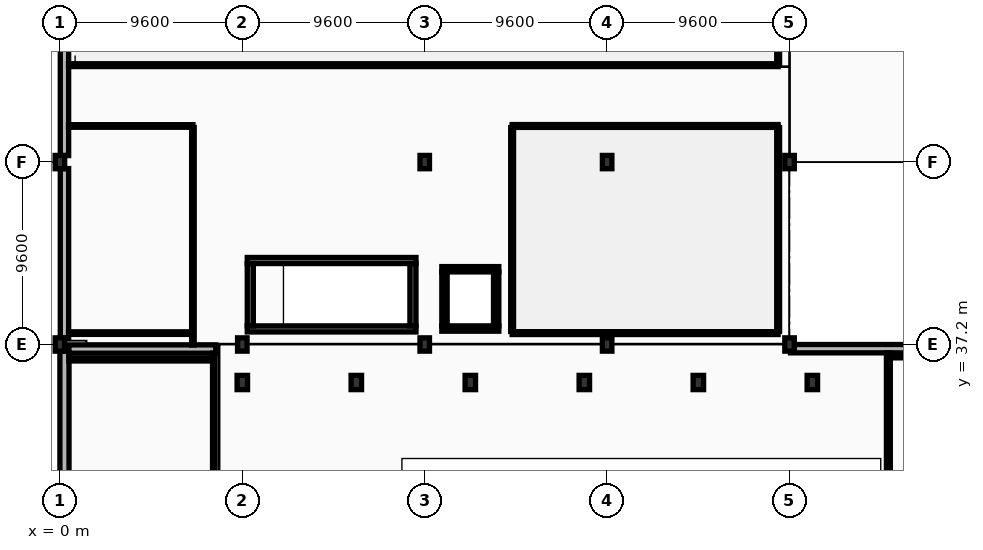
"""IFC4 building model, lengths in metres.
Left out: names, types, materials, properties, quantities, classifications, styles, units other than length and angle.
Written with IfcOpenShell. Run it as: python <this file> out.ifc"""

import sys

from ifc_helpers import new_model, si_unit, direction, frame, frame_2d, origin, origin_2d, place, context, subcontext, project, spatial, rectangle, extrude, element, fill, save


model = new_model("IFC4")
c1 = context("Model", 3, precision=1e-05, world=origin(), true_north=direction((0.0, 1.0)))
c2 = subcontext(c1, "Body", "Model", "MODEL_VIEW")
j1 = project(units=[si_unit("LENGTHUNIT", "METRE"), si_unit("PLANEANGLEUNIT", "RADIAN")], contexts=[c1])
p1 = place(None, origin())
s1 = spatial("IfcSite", under=j1, at=p1, CompositionType="ELEMENT")
p2 = place(p1, origin())
s2 = spatial("IfcBuilding", under=s1, at=p2, CompositionType="ELEMENT")
p3 = place(p2, frame((0.0, 0.0, 5.4)))
s3 = spatial("IfcBuildingStorey", under=s2, at=p3, CompositionType="ELEMENT", Elevation=5.4)
for number, where, z_axis, x_axis in (
    (1, (0.0, 37.2, 0.0), (0.0, 0.0, 1.0), (1.0, 0.0, 0.0)),
    (2, (0.0, 46.8, 0.0), (0.0, 0.0, 1.0), (1.0, 0.0, 0.0)),
    (3, (9.6, 37.2, 0.0), (0.0, 0.0, 1.0), (1.0, 0.0, 0.0)),
    (4, (19.2, 37.2, 0.0), (0.0, 0.0, 1.0), (1.0, 0.0, 0.0)),
    (5, (19.2, 46.8, 0.0), (0.0, 0.0, 1.0), (1.0, 0.0, 0.0)),
    (6, (28.8, 37.2, 0.0), (0.0, 0.0, 1.0), (1.0, 0.0, 0.0)),
    (7, (28.8, 46.8, 0.0), (0.0, 0.0, 1.0), (1.0, 0.0, 0.0)),
    (8, (38.4, 37.2, 0.0), (0.0, 0.0, 1.0), (1.0, 0.0, 0.0)),
    (9, (38.4, 46.8, 0.0), (0.0, 0.0, 1.0), (1.0, 0.0, 0.0)),
):
    element("IfcColumn", number, at=place(p3, frame(where, z_axis=z_axis, x_axis=x_axis)), inside=s3, PredefinedType="COLUMN", context=c2, shape_type="SweptSolid", body=[
        extrude(rectangle(XDim=0.5, YDim=0.7, at=origin_2d()), origin(), (0.0, 0.0, 1.0), 4.5),
    ])
for number, where, z_axis, x_axis in (
    (10, (9.6, 35.2, 0.0), (0.0, 0.0, 1.0), (1.0, 0.0, 0.0)),
    (11, (15.6, 35.2, 0.0), (0.0, 0.0, 1.0), (1.0, 0.0, 0.0)),
    (12, (21.6, 35.2, 0.0), (0.0, 0.0, 1.0), (1.0, 0.0, 0.0)),
    (13, (27.6, 35.2, 0.0), (0.0, 0.0, 1.0), (1.0, 0.0, 0.0)),
    (14, (33.6, 35.2, 0.0), (0.0, 0.0, 1.0), (1.0, 0.0, 0.0)),
    (15, (39.6, 35.2, 0.0), (0.0, 0.0, 1.0), (1.0, 0.0, 0.0)),
):
    element("IfcColumn", number, at=place(p3, frame(where, z_axis=z_axis, x_axis=x_axis)), inside=s3, PredefinedType="COLUMN", context=c2, shape_type="SweptSolid", body=[
        extrude(rectangle(XDim=0.55, YDim=0.75, at=origin_2d()), origin(), (0.0, 0.0, 1.0), 4.5),
    ])
p4 = place(p3, frame((0.24, 37.542, 0.0), z_axis=(0.0, 0.0, 1.0), x_axis=(0.0, 1.0, 0.0)))
e16 = element("IfcWall", 16, at=p4, inside=s3, PredefinedType="STANDARD", context=c2, shape_type="SweptSolid", body=[
    extrude(rectangle(XDim=8.916, YDim=0.44, at=frame_2d((4.458, 0.0))), origin(), (0.0, 0.0, 1.0), 3.38),
])
p5 = place(p4, frame((1.308, 0.0, 0.9)))
e17 = element("IfcOpeningElement", 17, at=p5, cuts=e16, PredefinedType="OPENING", context=c2, shape_type="SweptSolid", body=[
    extrude(rectangle(XDim=1.3, YDim=2.1, at=frame_2d((0.65, 1.05))), frame((0.0, 0.23, 0.0), z_axis=(0.0, -1.0, 0.0), x_axis=(1.0, 0.0, 0.0)), (0.0, 0.0, 1.0), 0.46),
])
p6 = place(p4, frame((3.808, 0.0, 0.9)))
e18 = element("IfcOpeningElement", 18, at=p6, cuts=e16, PredefinedType="OPENING", context=c2, shape_type="SweptSolid", body=[
    extrude(rectangle(XDim=1.3, YDim=2.1, at=frame_2d((0.65, 1.05))), frame((0.0, 0.23, 0.0), z_axis=(0.0, -1.0, 0.0), x_axis=(1.0, 0.0, 0.0)), (0.0, 0.0, 1.0), 0.46),
])
p7 = place(p4, frame((6.308, 0.0, 0.9)))
e19 = element("IfcOpeningElement", 19, at=p7, cuts=e16, PredefinedType="OPENING", context=c2, shape_type="SweptSolid", body=[
    extrude(rectangle(XDim=1.3, YDim=2.1, at=frame_2d((0.65, 1.05))), frame((0.0, 0.23, 0.0), z_axis=(0.0, -1.0, 0.0), x_axis=(1.0, 0.0, 0.0)), (0.0, 0.0, 1.0), 0.46),
])
p8 = place(p3, frame((0.24, 47.142, 0.0), z_axis=(0.0, 0.0, 1.0), x_axis=(0.0, 1.0, 0.0)))
e20 = element("IfcWall", 20, at=p8, inside=s3, PredefinedType="STANDARD", context=c2, shape_type="SweptSolid", body=[
    extrude(rectangle(XDim=8.916, YDim=0.44, at=frame_2d((4.458, 0.0))), origin(), (0.0, 0.0, 1.0), 3.38),
])
p9 = place(p8, frame((6.308, 0.0, 0.9)))
e21 = element("IfcOpeningElement", 21, at=p9, cuts=e20, PredefinedType="OPENING", context=c2, shape_type="SweptSolid", body=[
    extrude(rectangle(XDim=1.3, YDim=2.1, at=frame_2d((0.65, 1.05))), frame((0.0, 0.23, 0.0), z_axis=(0.0, -1.0, 0.0), x_axis=(1.0, 0.0, 0.0)), (0.0, 0.0, 1.0), 0.46),
])
p10 = place(p3, frame((0.24, 29.017, 0.0), z_axis=(0.0, 0.0, 1.0), x_axis=(0.0, 1.0, 0.0)))
e22 = element("IfcWall", 22, at=p10, inside=s3, PredefinedType="STANDARD", context=c2, shape_type="SweptSolid", body=[
    extrude(rectangle(XDim=7.841, YDim=0.48, at=frame_2d((3.92, 0.0))), origin(), (0.0, 0.0, 1.0), 3.38),
])
p11 = place(p10, frame((1.533, 0.0, 0.85)))
e23 = element("IfcOpeningElement", 23, at=p11, cuts=e22, PredefinedType="OPENING", context=c2, shape_type="SweptSolid", body=[
    extrude(rectangle(XDim=1.6, YDim=2.25, at=frame_2d((0.8, 1.125))), frame((0.0, 0.25, 0.0), z_axis=(0.0, -1.0, 0.0), x_axis=(1.0, 0.0, 0.0)), (0.0, 0.0, 1.0), 0.5),
])
p12 = place(p10, frame((4.733, 0.0, 0.85)))
e24 = element("IfcOpeningElement", 24, at=p12, cuts=e22, PredefinedType="OPENING", context=c2, shape_type="SweptSolid", body=[
    extrude(rectangle(XDim=1.6, YDim=2.25, at=frame_2d((0.8, 1.125))), frame((0.0, 0.25, 0.0), z_axis=(0.0, -1.0, 0.0), x_axis=(1.0, 0.0, 0.0)), (0.0, 0.0, 1.0), 0.5),
])
p13 = place(p3, frame((0.472, 36.96, 0.0), z_axis=(0.0, 0.0, 1.0), x_axis=(1.0, 0.0, 0.0)))
e25 = element("IfcWall", 25, at=p13, inside=s3, PredefinedType="STANDARD", context=c2, shape_type="SweptSolid", body=[
    extrude(rectangle(XDim=7.728, YDim=0.44, at=frame_2d((3.864, 0.0))), origin(), (0.0, 0.0, 1.0), 3.38),
])
p14 = place(p3, frame((38.45, 36.98, 0.0), z_axis=(0.0, 0.0, 1.0), x_axis=(1.0, 0.0, 0.0)))
e26 = element("IfcWall", 26, at=p14, inside=s3, PredefinedType="STANDARD", context=c2, shape_type="SweptSolid", body=[
    extrude(rectangle(XDim=16.55, YDim=0.44, at=frame_2d((8.275, 0.0))), origin(), (0.0, 0.0, 1.0), 3.38),
])
for number, where, z_axis, x_axis in (
    (27, (9.86, 41.62, 0.0), (0.0, 0.0, 1.0), (1.0, 0.0, 0.0)),
    (28, (18.74, 38.02, 0.0), (0.0, 0.0, 1.0), (-1.0, 0.0, 0.0)),
):
    element("IfcWall", number, at=place(p3, frame(where, z_axis=z_axis, x_axis=x_axis)), inside=s3, PredefinedType="SHEAR", context=c2, shape_type="SweptSolid", body=[
        extrude(rectangle(XDim=8.88, YDim=0.32, at=frame_2d((4.44, 0.0))), origin(), (0.0, 0.0, 1.0), 4.24),
    ])
p15 = place(p3, frame((10.02, 38.18, 0.0), z_axis=(0.0, 0.0, 1.0), x_axis=(0.0, 1.0, 0.0)))
e29 = element("IfcWall", 29, at=p15, inside=s3, PredefinedType="SHEAR", context=c2, shape_type="SweptSolid", body=[
    extrude(rectangle(XDim=3.28, YDim=0.32, at=frame_2d((1.64, 0.0))), origin(), (0.0, 0.0, 1.0), 4.24),
])
p16 = place(p15, frame((1.065, 0.0, 0.0)))
e30 = element("IfcOpeningElement", 30, at=p16, cuts=e29, PredefinedType="OPENING", context=c2, shape_type="SweptSolid", body=[
    extrude(rectangle(XDim=1.15, YDim=2.2, at=frame_2d((0.575, 1.1))), frame((0.0, 0.17, 0.0), z_axis=(0.0, -1.0, 0.0), x_axis=(1.0, 0.0, 0.0)), (0.0, 0.0, 1.0), 0.34),
])
p17 = place(p3, frame((18.58, 41.46, 0.0), z_axis=(0.0, 0.0, 1.0), x_axis=(0.0, -1.0, 0.0)))
e31 = element("IfcWall", 31, at=p17, inside=s3, PredefinedType="SHEAR", context=c2, shape_type="SweptSolid", body=[
    extrude(rectangle(XDim=3.28, YDim=0.32, at=frame_2d((1.64, 0.0))), origin(), (0.0, 0.0, 1.0), 4.24),
])
p18 = place(p3, frame((20.1, 41.16, 0.0), z_axis=(0.0, 0.0, 1.0), x_axis=(1.0, 0.0, 0.0)))
e32 = element("IfcWall", 32, at=p18, inside=s3, PredefinedType="SHEAR", context=c2, shape_type="SweptSolid", body=[
    extrude(rectangle(XDim=3.0, YDim=0.28, at=frame_2d((1.5, 0.0))), origin(), (0.0, 0.0, 1.0), 4.24),
])
p19 = place(p18, frame((0.975, 0.0, 0.0)))
e33 = element("IfcOpeningElement", 33, at=p19, cuts=e32, PredefinedType="OPENING", context=c2, shape_type="SweptSolid", body=[
    extrude(rectangle(XDim=1.05, YDim=2.2, at=frame_2d((0.525, 1.1))), frame((0.0, 0.15, 0.0), z_axis=(0.0, -1.0, 0.0), x_axis=(1.0, 0.0, 0.0)), (0.0, 0.0, 1.0), 0.3),
])
p20 = place(p3, frame((23.1, 38.04, 0.0), z_axis=(0.0, 0.0, 1.0), x_axis=(-1.0, 0.0, 0.0)))
e34 = element("IfcWall", 34, at=p20, inside=s3, PredefinedType="SHEAR", context=c2, shape_type="SweptSolid", body=[
    extrude(rectangle(XDim=3.0, YDim=0.28, at=frame_2d((1.5, 0.0))), origin(), (0.0, 0.0, 1.0), 4.24),
])
for number, where, z_axis, x_axis in (
    (35, (20.24, 38.18, 0.0), (0.0, 0.0, 1.0), (0.0, 1.0, 0.0)),
    (36, (22.96, 41.02, 0.0), (0.0, 0.0, 1.0), (0.0, -1.0, 0.0)),
):
    element("IfcWall", number, at=place(p3, frame(where, z_axis=z_axis, x_axis=x_axis)), inside=s3, PredefinedType="SHEAR", context=c2, shape_type="SweptSolid", body=[
        extrude(rectangle(XDim=2.84, YDim=0.28, at=frame_2d((1.42, 0.0))), origin(), (0.0, 0.0, 1.0), 4.24),
    ])
p21 = place(p3, frame((37.8, 51.9, 0.0), z_axis=(0.0, 0.0, 1.0), x_axis=(-1.0, 0.0, 0.0)))
e37 = element("IfcWall", 37, at=p21, inside=s3, PredefinedType="PARTITIONING", context=c2, shape_type="SweptSolid", body=[
    extrude(rectangle(XDim=37.346, YDim=0.15, at=frame_2d((18.673, 0.0))), origin(), (0.0, 0.0, 1.0), 3.23),
])
p22 = place(p21, frame((2.107, 0.0, 0.0)))
e38 = element("IfcOpeningElement", 38, at=p22, cuts=e37, PredefinedType="OPENING", context=c2, shape_type="SweptSolid", body=[
    extrude(rectangle(XDim=1.5, YDim=2.35, at=frame_2d((0.75, 1.175))), frame((0.0, 0.085, 0.0), z_axis=(0.0, -1.0, 0.0), x_axis=(1.0, 0.0, 0.0)), (0.0, 0.0, 1.0), 0.17),
])
p23 = place(p3, frame((37.8, 66.515, 0.0), z_axis=(0.0, 0.0, 1.0), x_axis=(0.0, -1.0, 0.0)))
e39 = element("IfcWall", 39, at=p23, inside=s3, PredefinedType="PARTITIONING", context=c2, shape_type="SweptSolid", body=[
    extrude(rectangle(XDim=14.53, YDim=0.15, at=frame_2d((7.265, 0.0))), origin(), (0.0, 0.0, 1.0), 3.43),
])
p24 = place(p3, frame((0.454, 48.7, 0.0), z_axis=(0.0, 0.0, 1.0), x_axis=(1.0, 0.0, 0.0)))
e40 = element("IfcWall", 40, at=p24, inside=s3, PredefinedType="PARTITIONING", context=c2, shape_type="SweptSolid", body=[
    extrude(rectangle(XDim=6.546, YDim=0.135, at=frame_2d((3.273, 0.0))), origin(), (0.0, 0.0, 1.0), 3.38),
])
p25 = place(p24, frame((2.064, 0.0, 0.0)))
e41 = element("IfcOpeningElement", 41, at=p25, cuts=e40, PredefinedType="OPENING", context=c2, shape_type="SweptSolid", body=[
    extrude(rectangle(XDim=0.95, YDim=2.15, at=frame_2d((0.475, 1.075))), frame((0.0, 0.077, 0.0), z_axis=(0.0, -1.0, 0.0), x_axis=(1.0, 0.0, 0.0)), (0.0, 0.0, 1.0), 0.155),
])
p26 = place(p3, frame((7.0, 37.8, 0.0), z_axis=(0.0, 0.0, 1.0), x_axis=(-1.0, 0.0, 0.0)))
e42 = element("IfcWall", 42, at=p26, inside=s3, PredefinedType="PARTITIONING", context=c2, shape_type="SweptSolid", body=[
    extrude(rectangle(XDim=6.546, YDim=0.135, at=frame_2d((3.273, 0.0))), origin(), (0.0, 0.0, 1.0), 3.38),
])
p27 = place(p3, frame((7.0, 48.623, 0.0), z_axis=(0.0, 0.0, 1.0), x_axis=(0.0, -1.0, 0.0)))
e43 = element("IfcWall", 43, at=p27, inside=s3, PredefinedType="PARTITIONING", context=c2, shape_type="SweptSolid", body=[
    extrude(rectangle(XDim=11.448, YDim=0.135, at=frame_2d((5.724, 0.0))), origin(), (0.0, 0.0, 1.0), 3.43),
])
p28 = place(p3, frame((23.8, 48.7, 0.0), z_axis=(0.0, 0.0, 1.0), x_axis=(1.0, 0.0, 0.0)))
e44 = element("IfcWall", 44, at=p28, inside=s3, PredefinedType="PARTITIONING", context=c2, shape_type="SweptSolid", body=[
    extrude(rectangle(XDim=14.0, YDim=0.15, at=frame_2d((7.0, 0.0))), origin(), (0.0, 0.0, 1.0), 3.38),
])
p29 = place(p28, frame((7.43, 0.0, 0.0)))
e45 = element("IfcOpeningElement", 45, at=p29, cuts=e44, PredefinedType="OPENING", context=c2, shape_type="SweptSolid", body=[
    extrude(rectangle(XDim=1.5, YDim=2.35, at=frame_2d((0.75, 1.175))), frame((0.0, 0.085, 0.0), z_axis=(0.0, -1.0, 0.0), x_axis=(1.0, 0.0, 0.0)), (0.0, 0.0, 1.0), 0.17),
])
p30 = place(p3, frame((37.8, 37.8, 0.0), z_axis=(0.0, 0.0, 1.0), x_axis=(-1.0, 0.0, 0.0)))
e46 = element("IfcWall", 46, at=p30, inside=s3, PredefinedType="PARTITIONING", context=c2, shape_type="SweptSolid", body=[
    extrude(rectangle(XDim=14.0, YDim=0.15, at=frame_2d((7.0, 0.0))), origin(), (0.0, 0.0, 1.0), 3.38),
])
for number, where, z_axis, x_axis in (
    (47, (23.8, 37.885, 0.0), (0.0, 0.0, 1.0), (0.0, 1.0, 0.0)),
    (48, (37.8, 48.615, 0.0), (0.0, 0.0, 1.0), (0.0, -1.0, 0.0)),
):
    element("IfcWall", number, at=place(p3, frame(where, z_axis=z_axis, x_axis=x_axis)), inside=s3, PredefinedType="PARTITIONING", context=c2, shape_type="SweptSolid", body=[
        extrude(rectangle(XDim=10.73, YDim=0.15, at=frame_2d((5.365, 0.0))), origin(), (0.0, 0.0, 1.0), 3.43),
    ])
p31 = place(p3, frame((43.6, 36.6, 0.0), z_axis=(0.0, 0.0, 1.0), x_axis=(1.0, 0.0, 0.0)))
e49 = element("IfcWall", 49, at=p31, inside=s3, PredefinedType="STANDARD", context=c2, shape_type="SweptSolid", body=[
    extrude(rectangle(XDim=11.29, YDim=0.205, at=frame_2d((5.645, 0.0))), origin(), (0.0, 0.0, 1.0), 4.225),
])
p32 = place(p3, frame((43.6, 29.312, 0.0), z_axis=(0.0, 0.0, 1.0), x_axis=(0.0, 1.0, 0.0)))
e50 = element("IfcWall", 50, at=p32, inside=s3, PredefinedType="STANDARD", context=c2, shape_type="SweptSolid", body=[
    extrude(rectangle(XDim=7.454, YDim=0.205, at=frame_2d((3.727, 0.0))), origin(), (0.0, 0.0, 1.0), 3.57),
])
p33 = place(p32, frame((1.956, 0.0, 0.0)))
e51 = element("IfcOpeningElement", 51, at=p33, cuts=e50, PredefinedType="OPENING", context=c2, shape_type="SweptSolid", body=[
    extrude(rectangle(XDim=1.4, YDim=2.25, at=frame_2d((0.7, 1.125))), frame((0.0, 0.113, 0.0), z_axis=(0.0, -1.0, 0.0), x_axis=(1.0, 0.0, 0.0)), (0.0, 0.0, 1.0), 0.225),
])
p34 = place(p3, frame((0.474, 36.4, 0.0), z_axis=(0.0, 0.0, 1.0), x_axis=(1.0, 0.0, 0.0)))
e52 = element("IfcWall", 52, at=p34, inside=s3, PredefinedType="PARTITIONING", context=c2, shape_type="SweptSolid", body=[
    extrude(rectangle(XDim=7.626, YDim=0.135, at=frame_2d((3.813, 0.0))), origin(), (0.0, 0.0, 1.0), 4.225),
])
p35 = place(p3, frame((8.1, 36.746, 0.0), z_axis=(0.0, 0.0, 1.0), x_axis=(0.0, -1.0, 0.0)))
e53 = element("IfcWall", 53, at=p35, inside=s3, PredefinedType="PARTITIONING", context=c2, shape_type="SweptSolid", body=[
    extrude(rectangle(XDim=10.669, YDim=0.135, at=frame_2d((5.334, 0.0))), origin(), (0.0, 0.0, 1.0), 3.43),
])
p36 = place(p35, frame((4.377, 0.0, 0.0)))
e54 = element("IfcOpeningElement", 54, at=p36, cuts=e53, PredefinedType="OPENING", context=c2, shape_type="SweptSolid", body=[
    extrude(rectangle(XDim=1.02, YDim=2.15, at=frame_2d((0.51, 1.075))), frame((0.0, 0.077, 0.0), z_axis=(0.0, -1.0, 0.0), x_axis=(1.0, 0.0, 0.0)), (0.0, 0.0, 1.0), 0.155),
])
p37 = place(p5, origin())
e55 = element("IfcWindow", 55, at=p37, inside=s3, PartitioningType="SINGLE_PANEL", PredefinedType="WINDOW", context=c2, shape_type="SweptSolid", body=[
    extrude(rectangle(XDim=1.3, YDim=2.1, at=frame_2d((0.65, 1.05))), frame((0.0, 0.03, 0.0), z_axis=(0.0, -1.0, 0.0), x_axis=(1.0, 0.0, 0.0)), (0.0, 0.0, 1.0), 0.06),
])
fill(e17, e55)
p38 = place(p6, origin())
e56 = element("IfcWindow", 56, at=p38, inside=s3, PartitioningType="SINGLE_PANEL", PredefinedType="WINDOW", context=c2, shape_type="SweptSolid", body=[
    extrude(rectangle(XDim=1.3, YDim=2.1, at=frame_2d((0.65, 1.05))), frame((0.0, 0.03, 0.0), z_axis=(0.0, -1.0, 0.0), x_axis=(1.0, 0.0, 0.0)), (0.0, 0.0, 1.0), 0.06),
])
fill(e18, e56)
p39 = place(p7, origin())
e57 = element("IfcWindow", 57, at=p39, inside=s3, PartitioningType="SINGLE_PANEL", PredefinedType="WINDOW", context=c2, shape_type="SweptSolid", body=[
    extrude(rectangle(XDim=1.3, YDim=2.1, at=frame_2d((0.65, 1.05))), frame((0.0, 0.03, 0.0), z_axis=(0.0, -1.0, 0.0), x_axis=(1.0, 0.0, 0.0)), (0.0, 0.0, 1.0), 0.06),
])
fill(e19, e57)
p40 = place(p11, origin())
e58 = element("IfcWindow", 58, at=p40, inside=s3, PartitioningType="SINGLE_PANEL", PredefinedType="WINDOW", context=c2, shape_type="SweptSolid", body=[
    extrude(rectangle(XDim=1.6, YDim=2.25, at=frame_2d((0.8, 1.125))), frame((0.0, 0.03, 0.0), z_axis=(0.0, -1.0, 0.0), x_axis=(1.0, 0.0, 0.0)), (0.0, 0.0, 1.0), 0.06),
])
fill(e23, e58)
p41 = place(p12, origin())
e59 = element("IfcWindow", 59, at=p41, inside=s3, PartitioningType="SINGLE_PANEL", PredefinedType="WINDOW", context=c2, shape_type="SweptSolid", body=[
    extrude(rectangle(XDim=1.6, YDim=2.25, at=frame_2d((0.8, 1.125))), frame((0.0, 0.03, 0.0), z_axis=(0.0, -1.0, 0.0), x_axis=(1.0, 0.0, 0.0)), (0.0, 0.0, 1.0), 0.06),
])
fill(e24, e59)
p42 = place(p16, origin())
e60 = element("IfcDoor", 60, at=p42, inside=s3, OperationType="SINGLE_SWING_LEFT", PredefinedType="DOOR", context=c2, shape_type="SweptSolid", body=[
    extrude(rectangle(XDim=1.15, YDim=2.2, at=frame_2d((0.575, 1.1))), frame((0.0, 0.025, 0.0), z_axis=(0.0, -1.0, 0.0), x_axis=(1.0, 0.0, 0.0)), (0.0, 0.0, 1.0), 0.05),
])
fill(e30, e60)
p43 = place(p19, origin())
e61 = element("IfcDoor", 61, at=p43, inside=s3, OperationType="DOUBLE_DOOR_SLIDING", PredefinedType="DOOR", context=c2, shape_type="SweptSolid", body=[
    extrude(rectangle(XDim=1.05, YDim=2.2, at=frame_2d((0.525, 1.1))), frame((0.0, 0.025, 0.0), z_axis=(0.0, -1.0, 0.0), x_axis=(1.0, 0.0, 0.0)), (0.0, 0.0, 1.0), 0.05),
])
fill(e33, e61)
p44 = place(p22, origin())
e62 = element("IfcDoor", 62, at=p44, inside=s3, OperationType="DOUBLE_DOOR_SINGLE_SWING", PredefinedType="DOOR", context=c2, shape_type="SweptSolid", body=[
    extrude(rectangle(XDim=1.5, YDim=2.35, at=frame_2d((0.75, 1.175))), frame((0.0, 0.025, 0.0), z_axis=(0.0, -1.0, 0.0), x_axis=(1.0, 0.0, 0.0)), (0.0, 0.0, 1.0), 0.05),
])
fill(e38, e62)
p45 = place(p25, origin())
e63 = element("IfcDoor", 63, at=p45, inside=s3, OperationType="SINGLE_SWING_RIGHT", PredefinedType="DOOR", context=c2, shape_type="SweptSolid", body=[
    extrude(rectangle(XDim=0.95, YDim=2.15, at=frame_2d((0.475, 1.075))), frame((0.0, 0.025, 0.0), z_axis=(0.0, -1.0, 0.0), x_axis=(1.0, 0.0, 0.0)), (0.0, 0.0, 1.0), 0.05),
])
fill(e41, e63)
p46 = place(p29, origin())
e64 = element("IfcDoor", 64, at=p46, inside=s3, OperationType="DOUBLE_DOOR_SINGLE_SWING", PredefinedType="DOOR", context=c2, shape_type="SweptSolid", body=[
    extrude(rectangle(XDim=1.5, YDim=2.35, at=frame_2d((0.75, 1.175))), frame((0.0, 0.025, 0.0), z_axis=(0.0, -1.0, 0.0), x_axis=(1.0, 0.0, 0.0)), (0.0, 0.0, 1.0), 0.05),
])
fill(e45, e64)
p47 = place(p33, origin())
e65 = element("IfcDoor", 65, at=p47, inside=s3, OperationType="SINGLE_SWING_LEFT", PredefinedType="DOOR", context=c2, shape_type="SweptSolid", body=[
    extrude(rectangle(XDim=1.4, YDim=2.25, at=frame_2d((0.7, 1.125))), frame((0.0, 0.025, 0.0), z_axis=(0.0, -1.0, 0.0), x_axis=(1.0, 0.0, 0.0)), (0.0, 0.0, 1.0), 0.05),
])
fill(e51, e65)
p48 = place(p36, origin())
e66 = element("IfcDoor", 66, at=p48, inside=s3, OperationType="SINGLE_SWING_RIGHT", PredefinedType="DOOR", context=c2, shape_type="SweptSolid", body=[
    extrude(rectangle(XDim=1.02, YDim=2.15, at=frame_2d((0.51, 1.075))), frame((0.0, 0.025, 0.0), z_axis=(0.0, -1.0, 0.0), x_axis=(1.0, 0.0, 0.0)), (0.0, 0.0, 1.0), 0.05),
])
fill(e54, e66)
save(model, sys.argv[1])
